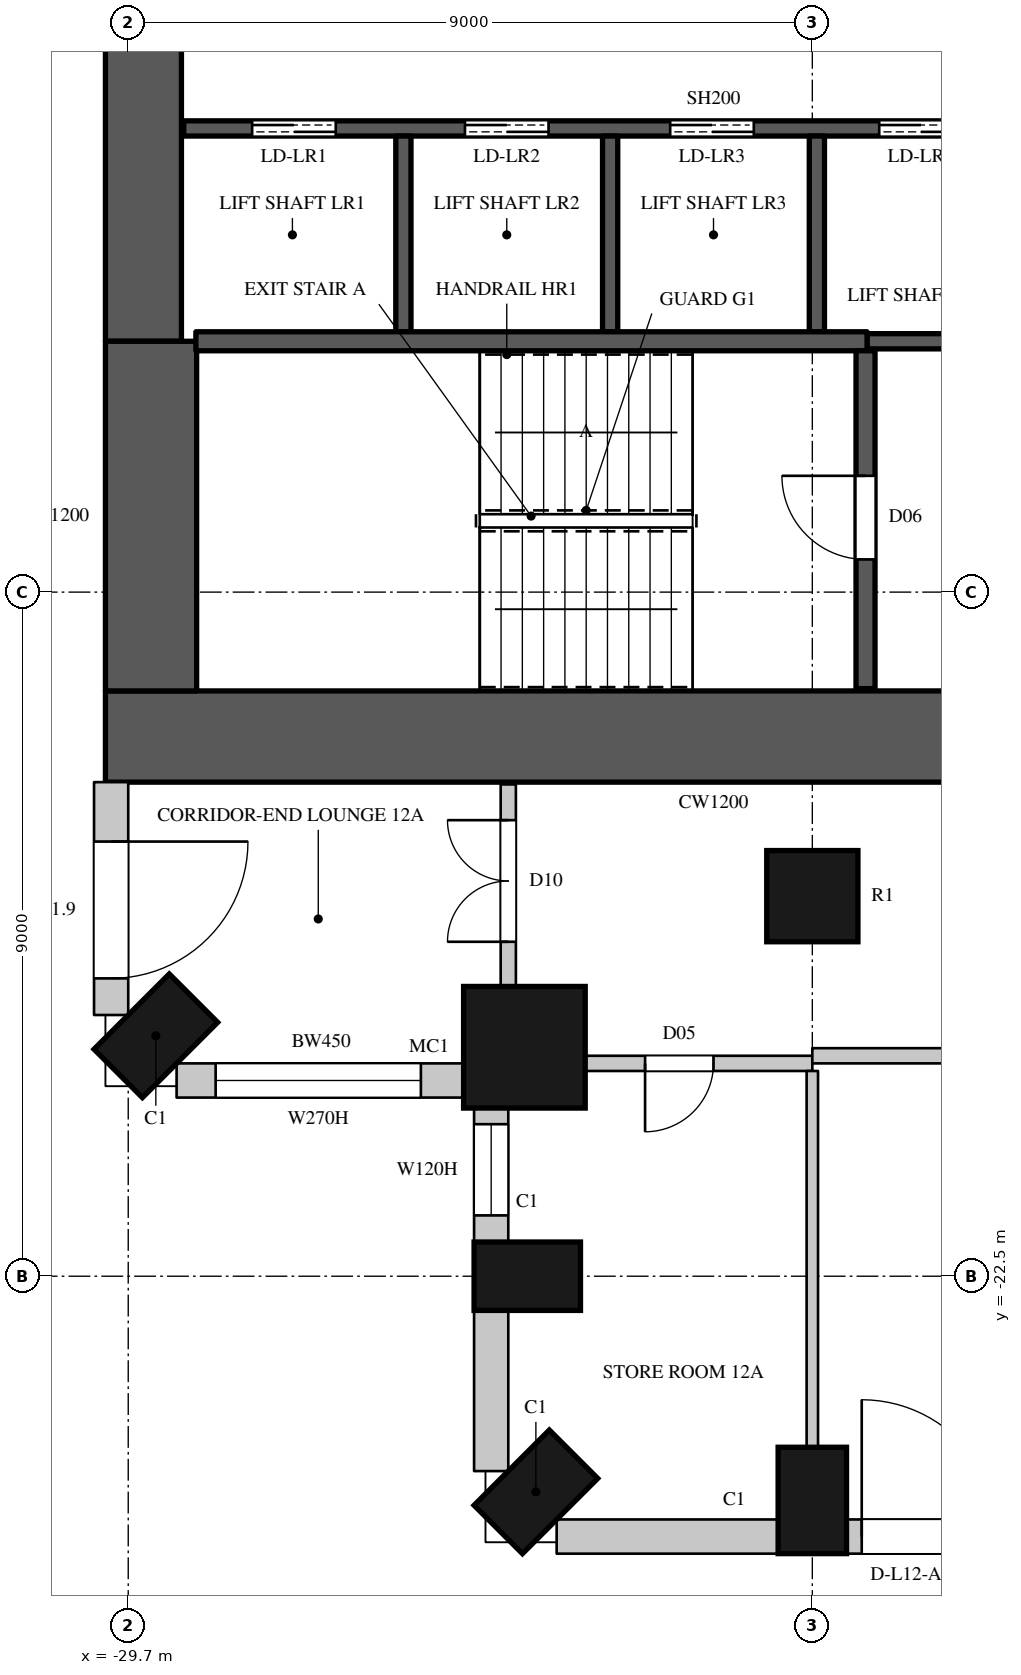
"""IFC4 building model, lengths in metres.
Left out: names, types, materials, properties, quantities, classifications, styles, units other than length and angle.
Written with IfcOpenShell. Run it as: python <this file> out.ifc"""

import sys

from ifc_helpers import new_model, si_unit, direction, frame, frame_2d, origin, origin_2d, place, context, subcontext, project, spatial, rectangle, circle, extrude, element, fill, save


model = new_model("IFC4")
c1 = context("Model", 3, precision=1e-05, world=origin(), true_north=direction((0.0, 1.0)))
c2 = subcontext(c1, "Body", "Model", "MODEL_VIEW")
j1 = project(units=[si_unit("LENGTHUNIT", "METRE"), si_unit("PLANEANGLEUNIT", "RADIAN")], contexts=[c1])
p1 = place(None, origin())
s1 = spatial("IfcSite", under=j1, at=p1, CompositionType="ELEMENT")
p2 = place(p1, origin())
s2 = spatial("IfcBuilding", under=s1, at=p2, CompositionType="ELEMENT")
p3 = place(p2, frame((0.0, 0.0, 73.5)))
s3 = spatial("IfcBuildingStorey", under=s2, at=p3, CompositionType="ELEMENT", Elevation=73.5)
p4 = place(p3, frame((-29.337, -19.337, 0.0), z_axis=(0.0, 0.0, 1.0), x_axis=(0.707106781187, -0.707106781187, 0.0)))
e1 = element("IfcColumn", 1, at=p4, inside=s3, PredefinedType="COLUMN", context=c2, shape_type="SweptSolid", body=[
    extrude(rectangle(XDim=0.9, YDim=1.4, at=origin_2d()), origin(), (0.0, 0.0, 1.0), 3.6),
])
p5 = place(p3, frame((-24.488, -19.488, 0.0), z_axis=(0.0, 0.0, 1.0), x_axis=(1.0, 0.0, 0.0)))
e2 = element("IfcColumn", 2, at=p5, inside=s3, PredefinedType="COLUMN", context=c2, shape_type="SweptSolid", body=[
    extrude(circle(Radius=0.8, at=origin_2d()), origin(), (0.0, 0.0, 1.0), 3.6),
])
for number, where, z_axis, x_axis in (
    (3, (-24.45, -22.5, 0.0), (0.0, 0.0, 1.0), (0.0, -1.0, 0.0)),
    (4, (-24.337, -25.337, 0.0), (0.0, 0.0, 1.0), (0.707, -0.707, 0.0)),
    (5, (-20.7, -25.45, 0.0), (0.0, 0.0, 1.0), (1.0, 0.0, 0.0)),
):
    element("IfcColumn", number, at=place(p3, frame(where, z_axis=z_axis, x_axis=x_axis)), inside=s3, PredefinedType="COLUMN", context=c2, shape_type="SweptSolid", body=[
        extrude(rectangle(XDim=0.9, YDim=1.4, at=origin_2d()), origin(), (0.0, 0.0, 1.0), 3.6),
    ])
p6 = place(p3, frame((-20.7, -17.5, 0.0), z_axis=(0.0, 0.0, 1.0), x_axis=(1.0, 0.0, 0.0)))
e6 = element("IfcColumn", 6, at=p6, inside=s3, PredefinedType="COLUMN", context=c2, shape_type="SweptSolid", body=[
    extrude(circle(Radius=0.6, at=origin_2d()), origin(), (0.0, 0.0, 1.0), 3.6),
])
p7 = place(p3, frame((-29.925, -16.0, 0.0), z_axis=(0.0, 0.0, 1.0), x_axis=(0.0, -1.0, 0.0)))
e7 = element("IfcWall", 7, at=p7, inside=s3, PredefinedType="SOLIDWALL", context=c2, shape_type="SweptSolid", body=[
    extrude(rectangle(XDim=3.064, YDim=0.45, at=frame_2d((1.532, 0.0))), origin(), (0.0, 0.0, 1.0), 3.3),
])
p8 = place(p7, frame((0.782, 0.0, 0.0)))
e8 = element("IfcOpeningElement", 8, at=p8, cuts=e7, PredefinedType="OPENING", context=c2, shape_type="SweptSolid", body=[
    extrude(rectangle(XDim=1.8, YDim=2.4, at=frame_2d((0.9, 1.2))), frame((0.0, 0.235, 0.0), z_axis=(0.0, -1.0, 0.0), x_axis=(1.0, 0.0, 0.0)), (0.0, 0.0, 1.0), 0.47),
])
p9 = place(p3, frame((-29.064, -19.925, 0.0), z_axis=(0.0, 0.0, 1.0), x_axis=(1.0, 0.0, 0.0)))
e9 = element("IfcWall", 9, at=p9, inside=s3, PredefinedType="SOLIDWALL", context=c2, shape_type="SweptSolid", body=[
    extrude(rectangle(XDim=3.805, YDim=0.45, at=frame_2d((1.903, 0.0))), origin(), (0.0, 0.0, 1.0), 3.3),
])
p10 = place(p9, frame((0.514, 0.0, 1.05)))
e10 = element("IfcOpeningElement", 10, at=p10, cuts=e9, PredefinedType="OPENING", context=c2, shape_type="SweptSolid", body=[
    extrude(rectangle(XDim=2.7, YDim=2.0, at=frame_2d((1.35, 1.0))), frame((0.0, 0.235, 0.0), z_axis=(0.0, -1.0, 0.0), x_axis=(1.0, 0.0, 0.0)), (0.0, 0.0, 1.0), 0.47),
])
p11 = place(p3, frame((-24.925, -20.259, 0.0), z_axis=(0.0, 0.0, 1.0), x_axis=(0.0, -1.0, 0.0)))
e11 = element("IfcWall", 11, at=p11, inside=s3, PredefinedType="SOLIDWALL", context=c2, shape_type="SweptSolid", body=[
    extrude(rectangle(XDim=1.792, YDim=0.45, at=frame_2d((0.896, 0.0))), origin(), (0.0, 0.0, 1.0), 3.3),
])
p12 = place(p11, frame((0.241, 0.0, 1.05)))
e12 = element("IfcOpeningElement", 12, at=p12, cuts=e11, PredefinedType="OPENING", context=c2, shape_type="SweptSolid", body=[
    extrude(rectangle(XDim=1.2, YDim=2.0, at=frame_2d((0.6, 1.0))), frame((0.0, 0.235, 0.0), z_axis=(0.0, -1.0, 0.0), x_axis=(1.0, 0.0, 0.0)), (0.0, 0.0, 1.0), 0.47),
])
p13 = place(p3, frame((-24.925, -22.95, 0.0), z_axis=(0.0, 0.0, 1.0), x_axis=(0.0, -1.0, 0.0)))
e13 = element("IfcWall", 13, at=p13, inside=s3, PredefinedType="SOLIDWALL", context=c2, shape_type="SweptSolid", body=[
    extrude(rectangle(XDim=2.114, YDim=0.45, at=frame_2d((1.057, 0.0))), origin(), (0.0, 0.0, 1.0), 3.3),
])
p14 = place(p3, frame((-24.064, -25.925, 0.0), z_axis=(0.0, 0.0, 1.0), x_axis=(1.0, 0.0, 0.0)))
e14 = element("IfcWall", 14, at=p14, inside=s3, PredefinedType="SOLIDWALL", context=c2, shape_type="SweptSolid", body=[
    extrude(rectangle(XDim=2.914, YDim=0.45, at=frame_2d((1.457, 0.0))), origin(), (0.0, 0.0, 1.0), 3.3),
])
p15 = place(p3, frame((-20.25, -25.925, 0.0), z_axis=(0.0, 0.0, 1.0), x_axis=(1.0, 0.0, 0.0)))
e15 = element("IfcWall", 15, at=p15, inside=s3, PredefinedType="SOLIDWALL", context=c2, shape_type="SweptSolid", body=[
    extrude(rectangle(XDim=8.1, YDim=0.45, at=frame_2d((4.05, 0.0))), origin(), (0.0, 0.0, 1.0), 3.3),
])
p16 = place(p15, frame((0.2, 0.0, 0.0)))
e16 = element("IfcOpeningElement", 16, at=p16, cuts=e15, PredefinedType="OPENING", context=c2, shape_type="SweptSolid", body=[
    extrude(rectangle(XDim=1.8, YDim=2.4, at=frame_2d((0.9, 1.2))), frame((0.0, 0.235, 0.0), z_axis=(0.0, -1.0, 0.0), x_axis=(1.0, 0.0, 0.0)), (0.0, 0.0, 1.0), 0.47),
])
p17 = place(p15, frame((2.2, 0.0, 1.05)))
e17 = element("IfcOpeningElement", 17, at=p17, cuts=e15, PredefinedType="OPENING", context=c2, shape_type="SweptSolid", body=[
    extrude(rectangle(XDim=1.2, YDim=2.0, at=frame_2d((0.6, 1.0))), frame((0.0, 0.235, 0.0), z_axis=(0.0, -1.0, 0.0), x_axis=(1.0, 0.0, 0.0)), (0.0, 0.0, 1.0), 0.47),
])
p18 = place(p15, frame((4.7, 0.0, 0.0)))
e18 = element("IfcOpeningElement", 18, at=p18, cuts=e15, PredefinedType="OPENING", context=c2, shape_type="SweptSolid", body=[
    extrude(rectangle(XDim=1.8, YDim=2.4, at=frame_2d((0.9, 1.2))), frame((0.0, 0.235, 0.0), z_axis=(0.0, -1.0, 0.0), x_axis=(1.0, 0.0, 0.0)), (0.0, 0.0, 1.0), 0.47),
])
p19 = place(p15, frame((6.7, 0.0, 1.05)))
e19 = element("IfcOpeningElement", 19, at=p19, cuts=e15, PredefinedType="OPENING", context=c2, shape_type="SweptSolid", body=[
    extrude(rectangle(XDim=1.2, YDim=2.0, at=frame_2d((0.6, 1.0))), frame((0.0, 0.235, 0.0), z_axis=(0.0, -1.0, 0.0), x_axis=(1.0, 0.0, 0.0)), (0.0, 0.0, 1.0), 0.47),
])
p20 = place(p3, frame((-30.0, -15.4, 0.0), z_axis=(0.0, 0.0, 1.0), x_axis=(1.0, 0.0, 0.0)))
e20 = element("IfcWall", 20, at=p20, inside=s3, PredefinedType="SHEAR", context=c2, shape_type="SweptSolid", body=[
    extrude(rectangle(XDim=16.0, YDim=1.2, at=frame_2d((8.0, 0.0))), origin(), (0.0, 0.0, 1.0), 3.6),
])
p21 = place(p20, frame((13.4, 0.0, 0.0)))
e21 = element("IfcOpeningElement", 21, at=p21, cuts=e20, PredefinedType="OPENING", context=c2, shape_type="SweptSolid", body=[
    extrude(rectangle(XDim=1.5, YDim=2.4, at=frame_2d((0.75, 1.2))), frame((0.0, 0.61, 0.0), z_axis=(0.0, -1.0, 0.0), x_axis=(1.0, 0.0, 0.0)), (0.0, 0.0, 1.0), 1.22),
])
p22 = place(p3, frame((-29.5, -10.2, 0.0), z_axis=(0.0, 0.0, 1.0), x_axis=(0.0, 1.0, 0.0)))
e22 = element("IfcWall", 22, at=p22, inside=s3, PredefinedType="SHEAR", context=c2, shape_type="SweptSolid", body=[
    extrude(rectangle(XDim=20.4, YDim=1.0, at=frame_2d((10.2, 0.0))), origin(), (0.0, 0.0, 1.0), 3.6),
])
p23 = place(p3, frame((-29.4, -14.8, 0.0), z_axis=(0.0, 0.0, 1.0), x_axis=(0.0, 1.0, 0.0)))
e23 = element("IfcWall", 23, at=p23, inside=s3, PredefinedType="SHEAR", context=c2, shape_type="SweptSolid", body=[
    extrude(rectangle(XDim=4.6, YDim=1.2, at=frame_2d((2.3, 0.0))), origin(), (0.0, 0.0, 1.0), 3.6),
])
p24 = place(p3, frame((-24.7, -18.7, 0.0), z_axis=(0.0, 0.0, 1.0), x_axis=(0.0, 1.0, 0.0)))
e24 = element("IfcWall", 24, at=p24, inside=s3, PredefinedType="PARTITIONING", context=c2, shape_type="SweptSolid", body=[
    extrude(rectangle(XDim=2.67, YDim=0.2, at=frame_2d((1.335, 0.0))), origin(), (0.0, 0.0, 1.0), 3.3),
])
p25 = place(p24, frame((0.6, 0.0, 0.0)))
e25 = element("IfcOpeningElement", 25, at=p25, cuts=e24, PredefinedType="OPENING", context=c2, shape_type="SweptSolid", body=[
    extrude(rectangle(XDim=1.6, YDim=2.4, at=frame_2d((0.8, 1.2))), frame((0.0, 0.11, 0.0), z_axis=(0.0, -1.0, 0.0), x_axis=(1.0, 0.0, 0.0)), (0.0, 0.0, 1.0), 0.22),
])
p26 = place(p3, frame((-23.7, -19.7, 0.0), z_axis=(0.0, 0.0, 1.0), x_axis=(1.0, 0.0, 0.0)))
e26 = element("IfcWall", 26, at=p26, inside=s3, PredefinedType="PARTITIONING", context=c2, shape_type="SweptSolid", body=[
    extrude(rectangle(XDim=3.0, YDim=0.2, at=frame_2d((1.5, 0.0))), origin(), (0.0, 0.0, 1.0), 3.3),
])
p27 = place(p26, frame((0.8, 0.0, 0.0)))
e27 = element("IfcOpeningElement", 27, at=p27, cuts=e26, PredefinedType="OPENING", context=c2, shape_type="SweptSolid", body=[
    extrude(rectangle(XDim=0.9, YDim=2.2, at=frame_2d((0.45, 1.1))), frame((0.0, 0.11, 0.0), z_axis=(0.0, -1.0, 0.0), x_axis=(1.0, 0.0, 0.0)), (0.0, 0.0, 1.0), 0.22),
])
p28 = place(p3, frame((-20.7, -19.6, 0.0), z_axis=(0.0, 0.0, 1.0), x_axis=(1.0, 0.0, 0.0)))
e28 = element("IfcWall", 28, at=p28, inside=s3, PredefinedType="PARTITIONING", context=c2, shape_type="SweptSolid", body=[
    extrude(rectangle(XDim=38.825, YDim=0.2, at=frame_2d((19.413, 0.0))), origin(), (0.0, 0.0, 1.0), 3.3),
])
p29 = place(p28, frame((3.15, 0.0, 0.0)))
e29 = element("IfcOpeningElement", 29, at=p29, cuts=e28, PredefinedType="OPENING", context=c2, shape_type="SweptSolid", body=[
    extrude(rectangle(XDim=0.95, YDim=2.2, at=frame_2d((0.475, 1.1))), frame((0.0, 0.11, 0.0), z_axis=(0.0, -1.0, 0.0), x_axis=(1.0, 0.0, 0.0)), (0.0, 0.0, 1.0), 0.22),
])
p30 = place(p28, frame((13.9, 0.0, 0.0)))
e30 = element("IfcOpeningElement", 30, at=p30, cuts=e28, PredefinedType="OPENING", context=c2, shape_type="SweptSolid", body=[
    extrude(rectangle(XDim=0.95, YDim=2.2, at=frame_2d((0.475, 1.1))), frame((0.0, 0.11, 0.0), z_axis=(0.0, -1.0, 0.0), x_axis=(1.0, 0.0, 0.0)), (0.0, 0.0, 1.0), 0.22),
])
p31 = place(p28, frame((21.15, 0.0, 0.0)))
e31 = element("IfcOpeningElement", 31, at=p31, cuts=e28, PredefinedType="OPENING", context=c2, shape_type="SweptSolid", body=[
    extrude(rectangle(XDim=0.95, YDim=2.2, at=frame_2d((0.475, 1.1))), frame((0.0, 0.11, 0.0), z_axis=(0.0, -1.0, 0.0), x_axis=(1.0, 0.0, 0.0)), (0.0, 0.0, 1.0), 0.22),
])
p32 = place(p28, frame((29.75, 0.0, 0.0)))
e32 = element("IfcOpeningElement", 32, at=p32, cuts=e28, PredefinedType="OPENING", context=c2, shape_type="SweptSolid", body=[
    extrude(rectangle(XDim=1.1, YDim=2.4, at=frame_2d((0.55, 1.2))), frame((0.0, 0.11, 0.0), z_axis=(0.0, -1.0, 0.0), x_axis=(1.0, 0.0, 0.0)), (0.0, 0.0, 1.0), 0.22),
])
p33 = place(p3, frame((-20.7, -24.75, 0.0), z_axis=(0.0, 0.0, 1.0), x_axis=(0.0, 1.0, 0.0)))
e33 = element("IfcWall", 33, at=p33, inside=s3, PredefinedType="PARTITIONING", context=c2, shape_type="SweptSolid", body=[
    extrude(rectangle(XDim=4.95, YDim=0.15, at=frame_2d((2.475, 0.0))), origin(), (0.0, 0.0, 1.0), 2.75),
])
p34 = place(p3, frame((-28.97, -7.4, 0.0), z_axis=(0.0, 0.0, 1.0), x_axis=(1.0, 0.0, 0.0)))
e34 = element("IfcWall", 34, at=p34, inside=s3, PredefinedType="SHEAR", context=c2, shape_type="SweptSolid", body=[
    extrude(rectangle(XDim=13.94, YDim=0.2, at=frame_2d((6.97, 0.0))), origin(), (0.0, 0.0, 1.0), 3.3),
])
p35 = place(p34, frame((0.9, 0.0, 0.0)))
e35 = element("IfcOpeningElement", 35, at=p35, cuts=e34, PredefinedType="OPENING", context=c2, shape_type="SweptSolid", body=[
    extrude(rectangle(XDim=1.1, YDim=2.2, at=frame_2d((0.55, 1.1))), frame((0.0, 0.11, 0.0), z_axis=(0.0, -1.0, 0.0), x_axis=(1.0, 0.0, 0.0)), (0.0, 0.0, 1.0), 0.22),
])
p36 = place(p34, frame((3.7, 0.0, 0.0)))
e36 = element("IfcOpeningElement", 36, at=p36, cuts=e34, PredefinedType="OPENING", context=c2, shape_type="SweptSolid", body=[
    extrude(rectangle(XDim=1.1, YDim=2.2, at=frame_2d((0.55, 1.1))), frame((0.0, 0.11, 0.0), z_axis=(0.0, -1.0, 0.0), x_axis=(1.0, 0.0, 0.0)), (0.0, 0.0, 1.0), 0.22),
])
p37 = place(p34, frame((6.4, 0.0, 0.0)))
e37 = element("IfcOpeningElement", 37, at=p37, cuts=e34, PredefinedType="OPENING", context=c2, shape_type="SweptSolid", body=[
    extrude(rectangle(XDim=1.1, YDim=2.2, at=frame_2d((0.55, 1.1))), frame((0.0, 0.11, 0.0), z_axis=(0.0, -1.0, 0.0), x_axis=(1.0, 0.0, 0.0)), (0.0, 0.0, 1.0), 0.22),
])
p38 = place(p34, frame((9.15, 0.0, 0.0)))
e38 = element("IfcOpeningElement", 38, at=p38, cuts=e34, PredefinedType="OPENING", context=c2, shape_type="SweptSolid", body=[
    extrude(rectangle(XDim=1.1, YDim=2.2, at=frame_2d((0.55, 1.1))), frame((0.0, 0.11, 0.0), z_axis=(0.0, -1.0, 0.0), x_axis=(1.0, 0.0, 0.0)), (0.0, 0.0, 1.0), 0.22),
])
for number, where, z_axis, x_axis in (
    (39, (-26.08, -10.075, 0.0), (0.0, 0.0, 1.0), (0.0, 1.0, 0.0)),
    (40, (-23.36, -10.075, 0.0), (0.0, 0.0, 1.0), (0.0, 1.0, 0.0)),
    (41, (-20.64, -10.075, 0.0), (0.0, 0.0, 1.0), (0.0, 1.0, 0.0)),
):
    element("IfcWall", number, at=place(p3, frame(where, z_axis=z_axis, x_axis=x_axis)), inside=s3, PredefinedType="SHEAR", context=c2, shape_type="SweptSolid", body=[
        extrude(rectangle(XDim=2.575, YDim=0.2, at=frame_2d((1.288, 0.0))), origin(), (0.0, 0.0, 1.0), 3.6),
    ])
p39 = place(p3, frame((-19.98, -10.2, 0.0), z_axis=(0.0, 0.0, 1.0), x_axis=(1.0, 0.0, 0.0)))
e42 = element("IfcWall", 42, at=p39, inside=s3, PredefinedType="SHEAR", context=c2, shape_type="SweptSolid", body=[
    extrude(rectangle(XDim=4.95, YDim=0.2, at=frame_2d((2.475, 0.0))), origin(), (0.0, 0.0, 1.0), 3.3),
])
p40 = place(p39, frame((2.95, 0.0, 0.0)))
e43 = element("IfcOpeningElement", 43, at=p40, cuts=e42, PredefinedType="OPENING", context=c2, shape_type="SweptSolid", body=[
    extrude(rectangle(XDim=1.1, YDim=2.2, at=frame_2d((0.55, 1.1))), frame((0.0, 0.11, 0.0), z_axis=(0.0, -1.0, 0.0), x_axis=(1.0, 0.0, 0.0)), (0.0, 0.0, 1.0), 0.22),
])
p41 = place(p3, frame((-28.81, -10.2, 0.0), z_axis=(0.0, 0.0, 1.0), x_axis=(1.0, 0.0, 0.0)))
e44 = element("IfcWall", 44, at=p41, inside=s3, PredefinedType="SHEAR", context=c2, shape_type="SweptSolid", body=[
    extrude(rectangle(XDim=8.83, YDim=0.25, at=frame_2d((4.415, 0.0))), origin(), (0.0, 0.0, 1.0), 3.3),
])
p42 = place(p3, frame((-20.0, -14.77, 0.0), z_axis=(0.0, 0.0, 1.0), x_axis=(0.0, 1.0, 0.0)))
e45 = element("IfcWall", 45, at=p42, inside=s3, PredefinedType="SHEAR", context=c2, shape_type="SweptSolid", body=[
    extrude(rectangle(XDim=4.445, YDim=0.25, at=frame_2d((2.223, 0.0))), origin(), (0.0, 0.0, 1.0), 3.3),
])
p43 = place(p42, frame((1.7, 0.0, 0.0)))
e46 = element("IfcOpeningElement", 46, at=p43, cuts=e45, PredefinedType="OPENING", context=c2, shape_type="SweptSolid", body=[
    extrude(rectangle(XDim=1.1, YDim=2.2, at=frame_2d((0.55, 1.1))), frame((0.0, 0.135, 0.0), z_axis=(0.0, -1.0, 0.0), x_axis=(1.0, 0.0, 0.0)), (0.0, 0.0, 1.0), 0.27),
])
p44 = place(p8, origin())
e47 = element("IfcDoor", 47, at=p44, inside=s3, OperationType="SLIDING_TO_LEFT", PredefinedType="DOOR", context=c2, shape_type="SweptSolid", body=[
    extrude(rectangle(XDim=1.8, YDim=2.4, at=frame_2d((0.9, 1.2))), frame((0.0, 0.13, 0.0), z_axis=(0.0, -1.0, 0.0), x_axis=(1.0, 0.0, 0.0)), (0.0, 0.0, 1.0), 0.05),
])
fill(e8, e47)
p45 = place(p10, origin())
e48 = element("IfcWindow", 48, at=p45, inside=s3, PartitioningType="SINGLE_PANEL", PredefinedType="WINDOW", context=c2, shape_type="SweptSolid", body=[
    extrude(rectangle(XDim=2.7, YDim=2.0, at=frame_2d((1.35, 1.0))), frame((0.0, 0.135, 0.0), z_axis=(0.0, -1.0, 0.0), x_axis=(1.0, 0.0, 0.0)), (0.0, 0.0, 1.0), 0.06),
])
fill(e10, e48)
p46 = place(p12, origin())
e49 = element("IfcWindow", 49, at=p46, inside=s3, PartitioningType="SINGLE_PANEL", PredefinedType="WINDOW", context=c2, shape_type="SweptSolid", body=[
    extrude(rectangle(XDim=1.2, YDim=2.0, at=frame_2d((0.6, 1.0))), frame((0.0, 0.135, 0.0), z_axis=(0.0, -1.0, 0.0), x_axis=(1.0, 0.0, 0.0)), (0.0, 0.0, 1.0), 0.06),
])
fill(e12, e49)
p47 = place(p16, origin())
e50 = element("IfcDoor", 50, at=p47, inside=s3, OperationType="SLIDING_TO_LEFT", PredefinedType="DOOR", context=c2, shape_type="SweptSolid", body=[
    extrude(rectangle(XDim=1.8, YDim=2.4, at=frame_2d((0.9, 1.2))), frame((0.0, 0.13, 0.0), z_axis=(0.0, -1.0, 0.0), x_axis=(1.0, 0.0, 0.0)), (0.0, 0.0, 1.0), 0.05),
])
fill(e16, e50)
p48 = place(p43, origin())
e51 = element("IfcDoor", 51, at=p48, inside=s3, OperationType="SINGLE_SWING_RIGHT", PredefinedType="DOOR", context=c2, shape_type="SweptSolid", body=[
    extrude(rectangle(XDim=1.1, YDim=2.2, at=frame_2d((0.55, 1.1))), frame((0.0, 0.025, 0.0), z_axis=(0.0, -1.0, 0.0), x_axis=(1.0, 0.0, 0.0)), (0.0, 0.0, 1.0), 0.05),
])
fill(e46, e51)
p49 = place(p35, origin())
e52 = element("IfcDoor", 52, at=p49, inside=s3, OperationType="DOUBLE_DOOR_SLIDING", PredefinedType="DOOR", context=c2, shape_type="SweptSolid", body=[
    extrude(rectangle(XDim=1.1, YDim=2.2, at=frame_2d((0.55, 1.1))), frame((0.0, 0.025, 0.0), z_axis=(0.0, -1.0, 0.0), x_axis=(1.0, 0.0, 0.0)), (0.0, 0.0, 1.0), 0.05),
])
fill(e35, e52)
p50 = place(p36, origin())
e53 = element("IfcDoor", 53, at=p50, inside=s3, OperationType="DOUBLE_DOOR_SLIDING", PredefinedType="DOOR", context=c2, shape_type="SweptSolid", body=[
    extrude(rectangle(XDim=1.1, YDim=2.2, at=frame_2d((0.55, 1.1))), frame((0.0, 0.025, 0.0), z_axis=(0.0, -1.0, 0.0), x_axis=(1.0, 0.0, 0.0)), (0.0, 0.0, 1.0), 0.05),
])
fill(e36, e53)
p51 = place(p37, origin())
e54 = element("IfcDoor", 54, at=p51, inside=s3, OperationType="DOUBLE_DOOR_SLIDING", PredefinedType="DOOR", context=c2, shape_type="SweptSolid", body=[
    extrude(rectangle(XDim=1.1, YDim=2.2, at=frame_2d((0.55, 1.1))), frame((0.0, 0.025, 0.0), z_axis=(0.0, -1.0, 0.0), x_axis=(1.0, 0.0, 0.0)), (0.0, 0.0, 1.0), 0.05),
])
fill(e37, e54)
p52 = place(p38, origin())
e55 = element("IfcDoor", 55, at=p52, inside=s3, OperationType="DOUBLE_DOOR_SLIDING", PredefinedType="DOOR", context=c2, shape_type="SweptSolid", body=[
    extrude(rectangle(XDim=1.1, YDim=2.2, at=frame_2d((0.55, 1.1))), frame((0.0, 0.025, 0.0), z_axis=(0.0, -1.0, 0.0), x_axis=(1.0, 0.0, 0.0)), (0.0, 0.0, 1.0), 0.05),
])
fill(e38, e55)
p53 = place(p27, origin())
e56 = element("IfcDoor", 56, at=p53, inside=s3, OperationType="SINGLE_SWING_RIGHT", PredefinedType="DOOR", context=c2, shape_type="SweptSolid", body=[
    extrude(rectangle(XDim=0.9, YDim=2.2, at=frame_2d((0.45, 1.1))), frame((0.0, 0.025, 0.0), z_axis=(0.0, -1.0, 0.0), x_axis=(1.0, 0.0, 0.0)), (0.0, 0.0, 1.0), 0.05),
])
fill(e27, e56)
p54 = place(p25, origin())
e57 = element("IfcDoor", 57, at=p54, inside=s3, OperationType="DOUBLE_DOOR_SINGLE_SWING", PredefinedType="DOOR", context=c2, shape_type="SweptSolid", body=[
    extrude(rectangle(XDim=1.6, YDim=2.4, at=frame_2d((0.8, 1.2))), frame((0.0, 0.025, 0.0), z_axis=(0.0, -1.0, 0.0), x_axis=(1.0, 0.0, 0.0)), (0.0, 0.0, 1.0), 0.05),
])
fill(e25, e57)
save(model, sys.argv[1])
